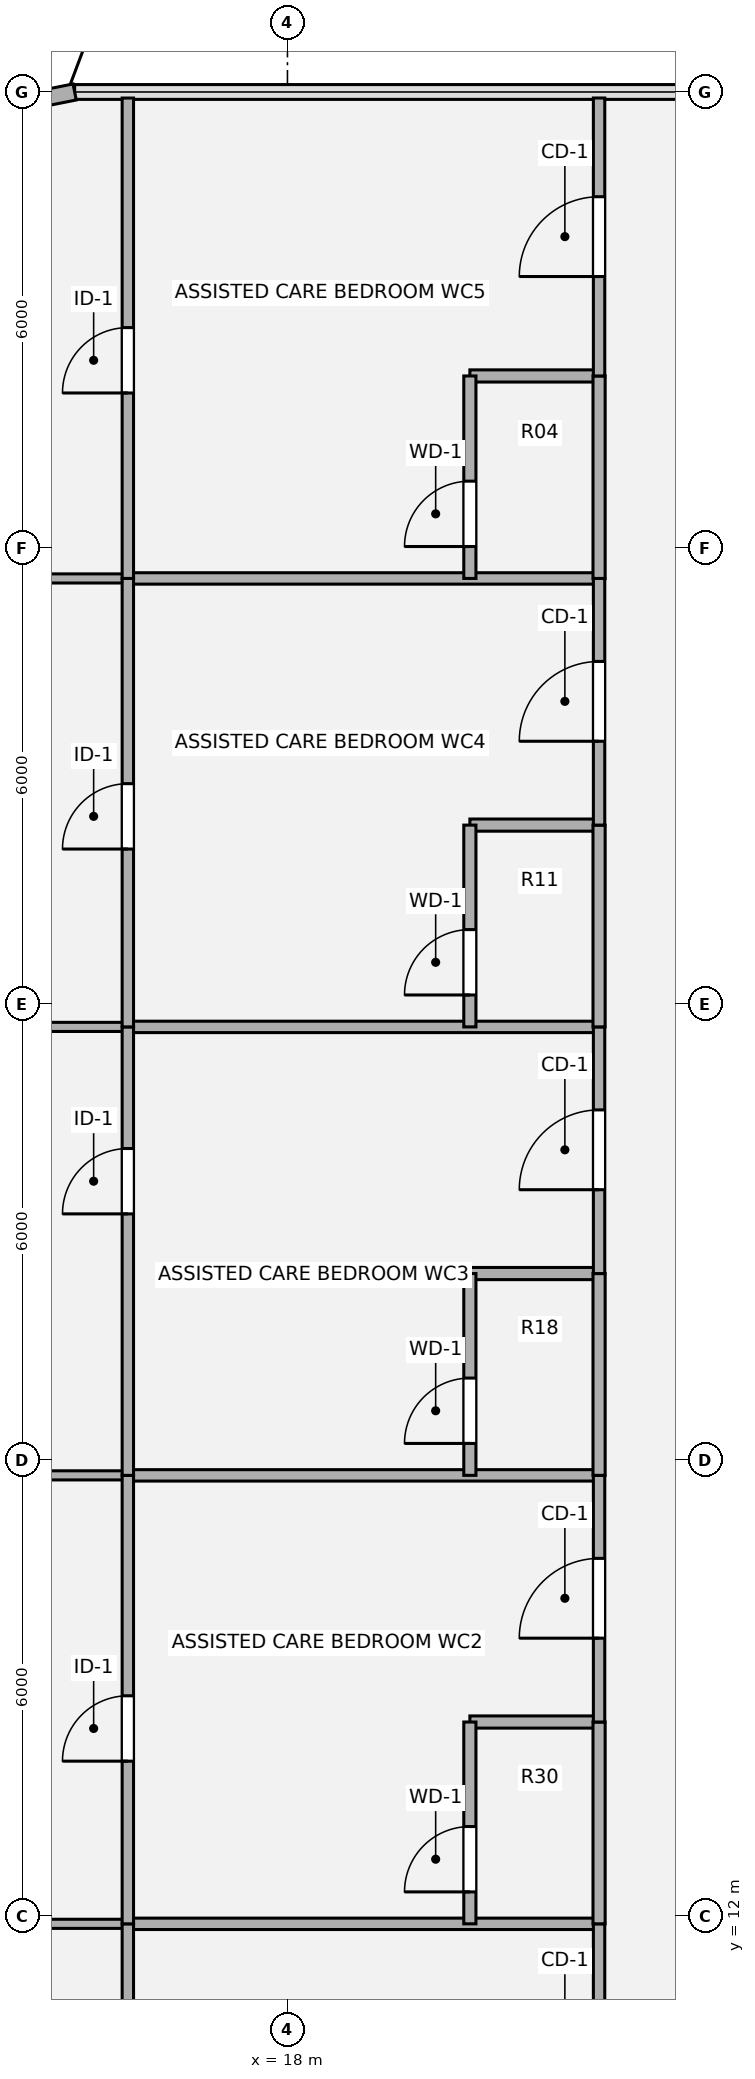
"""IFC4 building model, lengths in metres.
Left out: names, types, materials, properties, quantities, classifications, styles, units other than length and angle.
Written with IfcOpenShell. Run it as: python <this file> out.ifc"""

import sys

from ifc_helpers import new_model, si_unit, direction, frame, frame_2d, origin, origin_2d, place, context, subcontext, project, spatial, rectangle, extrude, source, transform, mapped, element, fill, save


model = new_model("IFC4")
c1 = context("Model", 3, precision=1e-05, world=origin(), true_north=direction((0.0, 1.0)))
c2 = subcontext(c1, "Body", "Model", "MODEL_VIEW")
j1 = project(units=[si_unit("LENGTHUNIT", "METRE"), si_unit("PLANEANGLEUNIT", "RADIAN")], contexts=[c1])
p1 = place(None, origin())
s1 = spatial("IfcSite", under=j1, at=p1, CompositionType="ELEMENT")
p2 = place(p1, origin())
s2 = spatial("IfcBuilding", under=s1, at=p2, CompositionType="ELEMENT")
p3 = place(p2, frame((0.0, 0.0, 42.12)))
s3 = spatial("IfcBuildingStorey", under=s2, at=p3, CompositionType="ELEMENT", Elevation=42.12)
p4 = place(p3, frame((13.975, 35.756, 0.0), z_axis=(0.0, 0.0, 1.0), x_axis=(0.980775717779, 0.195138390419, 0.0)))
e1 = element("IfcWall", 1, at=p4, inside=s3, PredefinedType="SOLIDWALL", context=c2, shape_type="SweptSolid", body=[
    extrude(rectangle(XDim=1.249, YDim=0.215, at=frame_2d((0.624, 0.0))), origin(), (0.0, 0.0, 1.0), 3.53),
])
p5 = place(p3, frame((12.08, 11.9, 0.0), z_axis=(0.0, 0.0, 1.0), x_axis=(1.0, 0.0, 0.0)))
e2 = element("IfcWall", 2, at=p5, inside=s3, PredefinedType="PARTITIONING", context=c2, shape_type="SweptSolid", body=[
    extrude(rectangle(XDim=3.82, YDim=0.12, at=frame_2d((1.91, 0.0))), origin(), (0.0, 0.0, 1.0), 3.5),
])
p6 = place(p3, frame((15.9, 11.9, 0.0), z_axis=(0.0, 0.0, 1.0), x_axis=(1.0, 0.0, 0.0)))
e3 = element("IfcWall", 3, at=p6, inside=s3, PredefinedType="PARTITIONING", context=c2, shape_type="SweptSolid", body=[
    extrude(rectangle(XDim=6.2, YDim=0.15, at=frame_2d((3.1, 0.0))), origin(), (0.0, 0.0, 1.0), 3.5),
])
p7 = place(p3, frame((20.4, 14.555, 0.0), z_axis=(0.0, 0.0, 1.0), x_axis=(1.0, 0.0, 0.0)))
e4 = element("IfcWall", 4, at=p7, inside=s3, PredefinedType="PLUMBINGWALL", context=c2, shape_type="SweptSolid", body=[
    extrude(rectangle(XDim=1.7, YDim=0.16, at=frame_2d((0.85, 0.0))), origin(), (0.0, 0.0, 1.0), 3.5),
])
p8 = place(p3, frame((12.08, 17.8, 0.0), z_axis=(0.0, 0.0, 1.0), x_axis=(1.0, 0.0, 0.0)))
e5 = element("IfcWall", 5, at=p8, inside=s3, PredefinedType="PARTITIONING", context=c2, shape_type="SweptSolid", body=[
    extrude(rectangle(XDim=3.82, YDim=0.12, at=frame_2d((1.91, 0.0))), origin(), (0.0, 0.0, 1.0), 3.5),
])
p9 = place(p3, frame((15.9, 17.8, 0.0), z_axis=(0.0, 0.0, 1.0), x_axis=(1.0, 0.0, 0.0)))
e6 = element("IfcWall", 6, at=p9, inside=s3, PredefinedType="PARTITIONING", context=c2, shape_type="SweptSolid", body=[
    extrude(rectangle(XDim=6.2, YDim=0.15, at=frame_2d((3.1, 0.0))), origin(), (0.0, 0.0, 1.0), 3.5),
])
p10 = place(p3, frame((20.4, 20.455, 0.0), z_axis=(0.0, 0.0, 1.0), x_axis=(1.0, 0.0, 0.0)))
e7 = element("IfcWall", 7, at=p10, inside=s3, PredefinedType="PLUMBINGWALL", context=c2, shape_type="SweptSolid", body=[
    extrude(rectangle(XDim=1.7, YDim=0.16, at=frame_2d((0.85, 0.0))), origin(), (0.0, 0.0, 1.0), 2.982),
])
p11 = place(p3, frame((12.08, 23.7, 0.0), z_axis=(0.0, 0.0, 1.0), x_axis=(1.0, 0.0, 0.0)))
e8 = element("IfcWall", 8, at=p11, inside=s3, PredefinedType="PARTITIONING", context=c2, shape_type="SweptSolid", body=[
    extrude(rectangle(XDim=3.82, YDim=0.12, at=frame_2d((1.91, 0.0))), origin(), (0.0, 0.0, 1.0), 2.982),
])
p12 = place(p3, frame((15.9, 23.7, 0.0), z_axis=(0.0, 0.0, 1.0), x_axis=(1.0, 0.0, 0.0)))
e9 = element("IfcWall", 9, at=p12, inside=s3, PredefinedType="PARTITIONING", context=c2, shape_type="SweptSolid", body=[
    extrude(rectangle(XDim=6.2, YDim=0.15, at=frame_2d((3.1, 0.0))), origin(), (0.0, 0.0, 1.0), 2.982),
])
p13 = place(p3, frame((20.4, 26.355, 0.0), z_axis=(0.0, 0.0, 1.0), x_axis=(1.0, 0.0, 0.0)))
e10 = element("IfcWall", 10, at=p13, inside=s3, PredefinedType="PLUMBINGWALL", context=c2, shape_type="SweptSolid", body=[
    extrude(rectangle(XDim=1.7, YDim=0.16, at=frame_2d((0.85, 0.0))), origin(), (0.0, 0.0, 1.0), 2.982),
])
p14 = place(p3, frame((12.08, 29.6, 0.0), z_axis=(0.0, 0.0, 1.0), x_axis=(1.0, 0.0, 0.0)))
e11 = element("IfcWall", 11, at=p14, inside=s3, PredefinedType="PARTITIONING", context=c2, shape_type="SweptSolid", body=[
    extrude(rectangle(XDim=3.82, YDim=0.12, at=frame_2d((1.91, 0.0))), origin(), (0.0, 0.0, 1.0), 2.982),
])
p15 = place(p3, frame((15.9, 29.6, 0.0), z_axis=(0.0, 0.0, 1.0), x_axis=(1.0, 0.0, 0.0)))
e12 = element("IfcWall", 12, at=p15, inside=s3, PredefinedType="PARTITIONING", context=c2, shape_type="SweptSolid", body=[
    extrude(rectangle(XDim=6.2, YDim=0.15, at=frame_2d((3.1, 0.0))), origin(), (0.0, 0.0, 1.0), 2.982),
])
p16 = place(p3, frame((20.4, 32.264, 0.0), z_axis=(0.0, 0.0, 1.0), x_axis=(1.0, 0.0, 0.0)))
e13 = element("IfcWall", 13, at=p16, inside=s3, PredefinedType="PLUMBINGWALL", context=c2, shape_type="SweptSolid", body=[
    extrude(rectangle(XDim=1.7, YDim=0.16, at=frame_2d((0.85, 0.0))), origin(), (0.0, 0.0, 1.0), 3.5),
])
p17 = place(p3, frame((15.9, 6.08, 0.0), z_axis=(0.0, 0.0, 1.0), x_axis=(0.0, 1.0, 0.0)))
e14 = element("IfcWall", 14, at=p17, inside=s3, PredefinedType="PARTITIONING", context=c2, shape_type="SweptSolid", body=[
    extrude(rectangle(XDim=5.82, YDim=0.15, at=frame_2d((2.91, 0.0))), origin(), (0.0, 0.0, 1.0), 3.5),
])
p18 = place(p17, frame((2.46, 0.0, 0.0)))
e15 = element("IfcOpeningElement", 15, at=p18, cuts=e14, PredefinedType="OPENING", context=c2, shape_type="SweptSolid", body=[
    extrude(rectangle(XDim=0.86, YDim=2.1, at=origin_2d()), frame((0.43, 0.085, 1.05), z_axis=(0.0, -1.0, 0.0), x_axis=(1.0, 0.0, 0.0)), (0.0, 0.0, 1.0), 0.17),
])
p19 = place(p3, frame((15.9, 11.9, 0.0), z_axis=(0.0, 0.0, 1.0), x_axis=(0.0, 1.0, 0.0)))
e16 = element("IfcWall", 16, at=p19, inside=s3, PredefinedType="PARTITIONING", context=c2, shape_type="SweptSolid", body=[
    extrude(rectangle(XDim=5.9, YDim=0.15, at=frame_2d((2.95, 0.0))), origin(), (0.0, 0.0, 1.0), 3.5),
])
p20 = place(p19, frame((2.14, 0.0, 0.0)))
e17 = element("IfcOpeningElement", 17, at=p20, cuts=e16, PredefinedType="OPENING", context=c2, shape_type="SweptSolid", body=[
    extrude(rectangle(XDim=0.86, YDim=2.1, at=origin_2d()), frame((0.43, 0.085, 1.05), z_axis=(0.0, -1.0, 0.0), x_axis=(1.0, 0.0, 0.0)), (0.0, 0.0, 1.0), 0.17),
])
p21 = place(p3, frame((15.9, 17.8, 0.0), z_axis=(0.0, 0.0, 1.0), x_axis=(0.0, 1.0, 0.0)))
e18 = element("IfcWall", 18, at=p21, inside=s3, PredefinedType="PARTITIONING", context=c2, shape_type="SweptSolid", body=[
    extrude(rectangle(XDim=5.9, YDim=0.15, at=frame_2d((2.95, 0.0))), origin(), (0.0, 0.0, 1.0), 3.5),
])
p22 = place(p21, frame((3.44, 0.0, 0.0)))
e19 = element("IfcOpeningElement", 19, at=p22, cuts=e18, PredefinedType="OPENING", context=c2, shape_type="SweptSolid", body=[
    extrude(rectangle(XDim=0.86, YDim=2.1, at=origin_2d()), frame((0.43, 0.085, 1.05), z_axis=(0.0, -1.0, 0.0), x_axis=(1.0, 0.0, 0.0)), (0.0, 0.0, 1.0), 0.17),
])
p23 = place(p3, frame((15.9, 23.7, 0.0), z_axis=(0.0, 0.0, 1.0), x_axis=(0.0, 1.0, 0.0)))
e20 = element("IfcWall", 20, at=p23, inside=s3, PredefinedType="PARTITIONING", context=c2, shape_type="SweptSolid", body=[
    extrude(rectangle(XDim=5.9, YDim=0.15, at=frame_2d((2.95, 0.0))), origin(), (0.0, 0.0, 1.0), 3.5),
])
p24 = place(p23, frame((2.34, 0.0, 0.0)))
e21 = element("IfcOpeningElement", 21, at=p24, cuts=e20, PredefinedType="OPENING", context=c2, shape_type="SweptSolid", body=[
    extrude(rectangle(XDim=0.86, YDim=2.1, at=origin_2d()), frame((0.43, 0.085, 1.05), z_axis=(0.0, -1.0, 0.0), x_axis=(1.0, 0.0, 0.0)), (0.0, 0.0, 1.0), 0.17),
])
p25 = place(p3, frame((15.9, 29.6, 0.0), z_axis=(0.0, 0.0, 1.0), x_axis=(0.0, 1.0, 0.0)))
e22 = element("IfcWall", 22, at=p25, inside=s3, PredefinedType="PARTITIONING", context=c2, shape_type="SweptSolid", body=[
    extrude(rectangle(XDim=6.32, YDim=0.15, at=frame_2d((3.16, 0.0))), origin(), (0.0, 0.0, 1.0), 3.5),
])
p26 = place(p25, frame((2.44, 0.0, 0.0)))
e23 = element("IfcOpeningElement", 23, at=p26, cuts=e22, PredefinedType="OPENING", context=c2, shape_type="SweptSolid", body=[
    extrude(rectangle(XDim=0.86, YDim=2.1, at=origin_2d()), frame((0.43, 0.085, 1.05), z_axis=(0.0, -1.0, 0.0), x_axis=(1.0, 0.0, 0.0)), (0.0, 0.0, 1.0), 0.17),
])
p27 = place(p3, frame((20.4, 11.9, 0.0), z_axis=(0.0, 0.0, 1.0), x_axis=(0.0, 1.0, 0.0)))
e24 = element("IfcWall", 24, at=p27, inside=s3, PredefinedType="PLUMBINGWALL", context=c2, shape_type="SweptSolid", body=[
    extrude(rectangle(XDim=2.655, YDim=0.16, at=frame_2d((1.328, 0.0))), origin(), (0.0, 0.0, 1.0), 3.5),
])
p28 = place(p27, frame((0.42, 0.0, 0.0)))
e25 = element("IfcOpeningElement", 25, at=p28, cuts=e24, PredefinedType="OPENING", context=c2, shape_type="SweptSolid", body=[
    extrude(rectangle(XDim=0.86, YDim=2.1, at=origin_2d()), frame((0.43, 0.09, 1.05), z_axis=(0.0, -1.0, 0.0), x_axis=(1.0, 0.0, 0.0)), (0.0, 0.0, 1.0), 0.18),
])
p29 = place(p3, frame((20.4, 17.8, 0.0), z_axis=(0.0, 0.0, 1.0), x_axis=(0.0, 1.0, 0.0)))
e26 = element("IfcWall", 26, at=p29, inside=s3, PredefinedType="PLUMBINGWALL", context=c2, shape_type="SweptSolid", body=[
    extrude(rectangle(XDim=2.655, YDim=0.16, at=frame_2d((1.328, 0.0))), origin(), (0.0, 0.0, 1.0), 3.5),
])
p30 = place(p29, frame((0.42, 0.0, 0.0)))
e27 = element("IfcOpeningElement", 27, at=p30, cuts=e26, PredefinedType="OPENING", context=c2, shape_type="SweptSolid", body=[
    extrude(rectangle(XDim=0.86, YDim=2.1, at=origin_2d()), frame((0.43, 0.09, 1.05), z_axis=(0.0, -1.0, 0.0), x_axis=(1.0, 0.0, 0.0)), (0.0, 0.0, 1.0), 0.18),
])
p31 = place(p3, frame((20.4, 23.7, 0.0), z_axis=(0.0, 0.0, 1.0), x_axis=(0.0, 1.0, 0.0)))
e28 = element("IfcWall", 28, at=p31, inside=s3, PredefinedType="PLUMBINGWALL", context=c2, shape_type="SweptSolid", body=[
    extrude(rectangle(XDim=2.655, YDim=0.16, at=frame_2d((1.328, 0.0))), origin(), (0.0, 0.0, 1.0), 3.5),
])
p32 = place(p31, frame((0.42, 0.0, 0.0)))
e29 = element("IfcOpeningElement", 29, at=p32, cuts=e28, PredefinedType="OPENING", context=c2, shape_type="SweptSolid", body=[
    extrude(rectangle(XDim=0.86, YDim=2.1, at=origin_2d()), frame((0.43, 0.09, 1.05), z_axis=(0.0, -1.0, 0.0), x_axis=(1.0, 0.0, 0.0)), (0.0, 0.0, 1.0), 0.18),
])
p33 = place(p3, frame((20.4, 29.6, 0.0), z_axis=(0.0, 0.0, 1.0), x_axis=(0.0, 1.0, 0.0)))
e30 = element("IfcWall", 30, at=p33, inside=s3, PredefinedType="PLUMBINGWALL", context=c2, shape_type="SweptSolid", body=[
    extrude(rectangle(XDim=2.664, YDim=0.16, at=frame_2d((1.332, 0.0))), origin(), (0.0, 0.0, 1.0), 3.5),
])
p34 = place(p33, frame((0.42, 0.0, 0.0)))
e31 = element("IfcOpeningElement", 31, at=p34, cuts=e30, PredefinedType="OPENING", context=c2, shape_type="SweptSolid", body=[
    extrude(rectangle(XDim=0.86, YDim=2.1, at=origin_2d()), frame((0.43, 0.09, 1.05), z_axis=(0.0, -1.0, 0.0), x_axis=(1.0, 0.0, 0.0)), (0.0, 0.0, 1.0), 0.18),
])
p35 = place(p3, frame((22.1, 8.699, 0.0), z_axis=(0.0, 0.0, 1.0), x_axis=(0.0, 1.0, 0.0)))
e32 = element("IfcWall", 32, at=p35, inside=s3, PredefinedType="PARTITIONING", context=c2, shape_type="SweptSolid", body=[
    extrude(rectangle(XDim=3.201, YDim=0.15, at=frame_2d((1.601, 0.0))), origin(), (0.0, 0.0, 1.0), 3.5),
])
p36 = place(p35, frame((1.081, 0.0, 0.0)))
e33 = element("IfcOpeningElement", 33, at=p36, cuts=e32, PredefinedType="OPENING", context=c2, shape_type="SweptSolid", body=[
    extrude(rectangle(XDim=1.05, YDim=2.1, at=origin_2d()), frame((0.525, 0.085, 1.05), z_axis=(0.0, -1.0, 0.0), x_axis=(1.0, 0.0, 0.0)), (0.0, 0.0, 1.0), 0.17),
])
p37 = place(p3, frame((22.1, 11.9, 0.0), z_axis=(0.0, 0.0, 1.0), x_axis=(0.0, 1.0, 0.0)))
e34 = element("IfcWall", 34, at=p37, inside=s3, PredefinedType="PLUMBINGWALL", context=c2, shape_type="SweptSolid", body=[
    extrude(rectangle(XDim=2.655, YDim=0.16, at=frame_2d((1.328, 0.0))), origin(), (0.0, 0.0, 1.0), 3.5),
])
p38 = place(p3, frame((22.1, 14.555, 0.0), z_axis=(0.0, 0.0, 1.0), x_axis=(0.0, 1.0, 0.0)))
e35 = element("IfcWall", 35, at=p38, inside=s3, PredefinedType="PARTITIONING", context=c2, shape_type="SweptSolid", body=[
    extrude(rectangle(XDim=3.245, YDim=0.15, at=frame_2d((1.623, 0.0))), origin(), (0.0, 0.0, 1.0), 3.5),
])
p39 = place(p38, frame((1.103, 0.0, 0.0)))
e36 = element("IfcOpeningElement", 36, at=p39, cuts=e35, PredefinedType="OPENING", context=c2, shape_type="SweptSolid", body=[
    extrude(rectangle(XDim=1.05, YDim=2.1, at=origin_2d()), frame((0.525, 0.085, 1.05), z_axis=(0.0, -1.0, 0.0), x_axis=(1.0, 0.0, 0.0)), (0.0, 0.0, 1.0), 0.17),
])
p40 = place(p3, frame((22.1, 17.8, 0.0), z_axis=(0.0, 0.0, 1.0), x_axis=(0.0, 1.0, 0.0)))
e37 = element("IfcWall", 37, at=p40, inside=s3, PredefinedType="PLUMBINGWALL", context=c2, shape_type="SweptSolid", body=[
    extrude(rectangle(XDim=2.655, YDim=0.16, at=frame_2d((1.328, 0.0))), origin(), (0.0, 0.0, 1.0), 3.5),
])
p41 = place(p3, frame((22.1, 20.455, 0.0), z_axis=(0.0, 0.0, 1.0), x_axis=(0.0, 1.0, 0.0)))
e38 = element("IfcWall", 38, at=p41, inside=s3, PredefinedType="PARTITIONING", context=c2, shape_type="SweptSolid", body=[
    extrude(rectangle(XDim=3.245, YDim=0.15, at=frame_2d((1.623, 0.0))), origin(), (0.0, 0.0, 1.0), 3.5),
])
p42 = place(p41, frame((1.103, 0.0, 0.0)))
e39 = element("IfcOpeningElement", 39, at=p42, cuts=e38, PredefinedType="OPENING", context=c2, shape_type="SweptSolid", body=[
    extrude(rectangle(XDim=1.05, YDim=2.1, at=origin_2d()), frame((0.525, 0.085, 1.05), z_axis=(0.0, -1.0, 0.0), x_axis=(1.0, 0.0, 0.0)), (0.0, 0.0, 1.0), 0.17),
])
p43 = place(p3, frame((22.1, 23.7, 0.0), z_axis=(0.0, 0.0, 1.0), x_axis=(0.0, 1.0, 0.0)))
e40 = element("IfcWall", 40, at=p43, inside=s3, PredefinedType="PLUMBINGWALL", context=c2, shape_type="SweptSolid", body=[
    extrude(rectangle(XDim=2.655, YDim=0.16, at=frame_2d((1.328, 0.0))), origin(), (0.0, 0.0, 1.0), 3.5),
])
p44 = place(p3, frame((22.1, 26.355, 0.0), z_axis=(0.0, 0.0, 1.0), x_axis=(0.0, 1.0, 0.0)))
e41 = element("IfcWall", 41, at=p44, inside=s3, PredefinedType="PARTITIONING", context=c2, shape_type="SweptSolid", body=[
    extrude(rectangle(XDim=3.245, YDim=0.15, at=frame_2d((1.623, 0.0))), origin(), (0.0, 0.0, 1.0), 3.5),
])
p45 = place(p44, frame((1.103, 0.0, 0.0)))
e42 = element("IfcOpeningElement", 42, at=p45, cuts=e41, PredefinedType="OPENING", context=c2, shape_type="SweptSolid", body=[
    extrude(rectangle(XDim=1.05, YDim=2.1, at=origin_2d()), frame((0.525, 0.085, 1.05), z_axis=(0.0, -1.0, 0.0), x_axis=(1.0, 0.0, 0.0)), (0.0, 0.0, 1.0), 0.17),
])
p46 = place(p3, frame((22.1, 29.6, 0.0), z_axis=(0.0, 0.0, 1.0), x_axis=(0.0, 1.0, 0.0)))
e43 = element("IfcWall", 43, at=p46, inside=s3, PredefinedType="PLUMBINGWALL", context=c2, shape_type="SweptSolid", body=[
    extrude(rectangle(XDim=2.664, YDim=0.16, at=frame_2d((1.332, 0.0))), origin(), (0.0, 0.0, 1.0), 3.5),
])
p47 = place(p3, frame((22.1, 32.264, 0.0), z_axis=(0.0, 0.0, 1.0), x_axis=(0.0, 1.0, 0.0)))
e44 = element("IfcWall", 44, at=p47, inside=s3, PredefinedType="PARTITIONING", context=c2, shape_type="SweptSolid", body=[
    extrude(rectangle(XDim=3.657, YDim=0.15, at=frame_2d((1.828, 0.0))), origin(), (0.0, 0.0, 1.0), 3.5),
])
p48 = place(p47, frame((1.308, 0.0, 0.0)))
e45 = element("IfcOpeningElement", 45, at=p48, cuts=e44, PredefinedType="OPENING", context=c2, shape_type="SweptSolid", body=[
    extrude(rectangle(XDim=1.05, YDim=2.1, at=origin_2d()), frame((0.525, 0.085, 1.05), z_axis=(0.0, -1.0, 0.0), x_axis=(1.0, 0.0, 0.0)), (0.0, 0.0, 1.0), 0.17),
])
m1 = source(origin(), c2, "Body", "SweptSolid", [
    extrude(rectangle(XDim=0.86, YDim=2.1, at=origin_2d()), frame((0.43, 0.025, 1.05), z_axis=(0.0, -1.0, 0.0), x_axis=(1.0, 0.0, 0.0)), (0.0, 0.0, 1.0), 0.05),
])
p49 = place(p20, origin())
e46 = element("IfcDoor", 46, at=p49, inside=s3, OperationType="SINGLE_SWING_LEFT", PredefinedType="DOOR", context=c2, shape_type="MappedRepresentation", body=[
    mapped(m1, transform((0.0, 0.0, 0.0), x_axis=(1.0, 0.0, 0.0), y_axis=(0.0, 1.0, 0.0), z_axis=(0.0, 0.0, 1.0), scale=1.0)),
])
fill(e17, e46)
p50 = place(p22, origin())
e47 = element("IfcDoor", 47, at=p50, inside=s3, OperationType="SINGLE_SWING_LEFT", PredefinedType="DOOR", context=c2, shape_type="MappedRepresentation", body=[
    mapped(m1, transform((0.0, 0.0, 0.0), x_axis=(1.0, 0.0, 0.0), y_axis=(0.0, 1.0, 0.0), z_axis=(0.0, 0.0, 1.0), scale=1.0)),
])
fill(e19, e47)
p51 = place(p24, origin())
e48 = element("IfcDoor", 48, at=p51, inside=s3, OperationType="SINGLE_SWING_LEFT", PredefinedType="DOOR", context=c2, shape_type="MappedRepresentation", body=[
    mapped(m1, transform((0.0, 0.0, 0.0), x_axis=(1.0, 0.0, 0.0), y_axis=(0.0, 1.0, 0.0), z_axis=(0.0, 0.0, 1.0), scale=1.0)),
])
fill(e21, e48)
p52 = place(p26, origin())
e49 = element("IfcDoor", 49, at=p52, inside=s3, OperationType="SINGLE_SWING_LEFT", PredefinedType="DOOR", context=c2, shape_type="MappedRepresentation", body=[
    mapped(m1, transform((0.0, 0.0, 0.0), x_axis=(1.0, 0.0, 0.0), y_axis=(0.0, 1.0, 0.0), z_axis=(0.0, 0.0, 1.0), scale=1.0)),
])
fill(e23, e49)
m2 = source(origin(), c2, "Body", "SweptSolid", [
    extrude(rectangle(XDim=0.86, YDim=2.1, at=origin_2d()), frame((0.43, 0.025, 1.05), z_axis=(0.0, -1.0, 0.0), x_axis=(1.0, 0.0, 0.0)), (0.0, 0.0, 1.0), 0.05),
])
p53 = place(p28, origin())
e50 = element("IfcDoor", 50, at=p53, inside=s3, OperationType="SINGLE_SWING_LEFT", PredefinedType="DOOR", context=c2, shape_type="MappedRepresentation", body=[
    mapped(m2, transform((0.0, 0.0, 0.0), x_axis=(1.0, 0.0, 0.0), y_axis=(0.0, 1.0, 0.0), z_axis=(0.0, 0.0, 1.0), scale=1.0)),
])
fill(e25, e50)
p54 = place(p30, origin())
e51 = element("IfcDoor", 51, at=p54, inside=s3, OperationType="SINGLE_SWING_LEFT", PredefinedType="DOOR", context=c2, shape_type="MappedRepresentation", body=[
    mapped(m2, transform((0.0, 0.0, 0.0), x_axis=(1.0, 0.0, 0.0), y_axis=(0.0, 1.0, 0.0), z_axis=(0.0, 0.0, 1.0), scale=1.0)),
])
fill(e27, e51)
p55 = place(p32, origin())
e52 = element("IfcDoor", 52, at=p55, inside=s3, OperationType="SINGLE_SWING_LEFT", PredefinedType="DOOR", context=c2, shape_type="MappedRepresentation", body=[
    mapped(m2, transform((0.0, 0.0, 0.0), x_axis=(1.0, 0.0, 0.0), y_axis=(0.0, 1.0, 0.0), z_axis=(0.0, 0.0, 1.0), scale=1.0)),
])
fill(e29, e52)
p56 = place(p34, origin())
e53 = element("IfcDoor", 53, at=p56, inside=s3, OperationType="SINGLE_SWING_LEFT", PredefinedType="DOOR", context=c2, shape_type="MappedRepresentation", body=[
    mapped(m2, transform((0.0, 0.0, 0.0), x_axis=(1.0, 0.0, 0.0), y_axis=(0.0, 1.0, 0.0), z_axis=(0.0, 0.0, 1.0), scale=1.0)),
])
fill(e31, e53)
m3 = source(origin(), c2, "Body", "SweptSolid", [
    extrude(rectangle(XDim=1.05, YDim=2.1, at=origin_2d()), frame((0.525, 0.025, 1.05), z_axis=(0.0, -1.0, 0.0), x_axis=(1.0, 0.0, 0.0)), (0.0, 0.0, 1.0), 0.05),
])
p57 = place(p39, origin())
e54 = element("IfcDoor", 54, at=p57, inside=s3, OperationType="SINGLE_SWING_LEFT", PredefinedType="DOOR", context=c2, shape_type="MappedRepresentation", body=[
    mapped(m3, transform((0.0, 0.0, 0.0), x_axis=(1.0, 0.0, 0.0), y_axis=(0.0, 1.0, 0.0), z_axis=(0.0, 0.0, 1.0), scale=1.0)),
])
fill(e36, e54)
p58 = place(p42, origin())
e55 = element("IfcDoor", 55, at=p58, inside=s3, OperationType="SINGLE_SWING_LEFT", PredefinedType="DOOR", context=c2, shape_type="MappedRepresentation", body=[
    mapped(m3, transform((0.0, 0.0, 0.0), x_axis=(1.0, 0.0, 0.0), y_axis=(0.0, 1.0, 0.0), z_axis=(0.0, 0.0, 1.0), scale=1.0)),
])
fill(e39, e55)
p59 = place(p45, origin())
e56 = element("IfcDoor", 56, at=p59, inside=s3, OperationType="SINGLE_SWING_LEFT", PredefinedType="DOOR", context=c2, shape_type="MappedRepresentation", body=[
    mapped(m3, transform((0.0, 0.0, 0.0), x_axis=(1.0, 0.0, 0.0), y_axis=(0.0, 1.0, 0.0), z_axis=(0.0, 0.0, 1.0), scale=1.0)),
])
fill(e42, e56)
p60 = place(p48, origin())
e57 = element("IfcDoor", 57, at=p60, inside=s3, OperationType="SINGLE_SWING_LEFT", PredefinedType="DOOR", context=c2, shape_type="MappedRepresentation", body=[
    mapped(m3, transform((0.0, 0.0, 0.0), x_axis=(1.0, 0.0, 0.0), y_axis=(0.0, 1.0, 0.0), z_axis=(0.0, 0.0, 1.0), scale=1.0)),
])
fill(e45, e57)
save(model, sys.argv[1])
